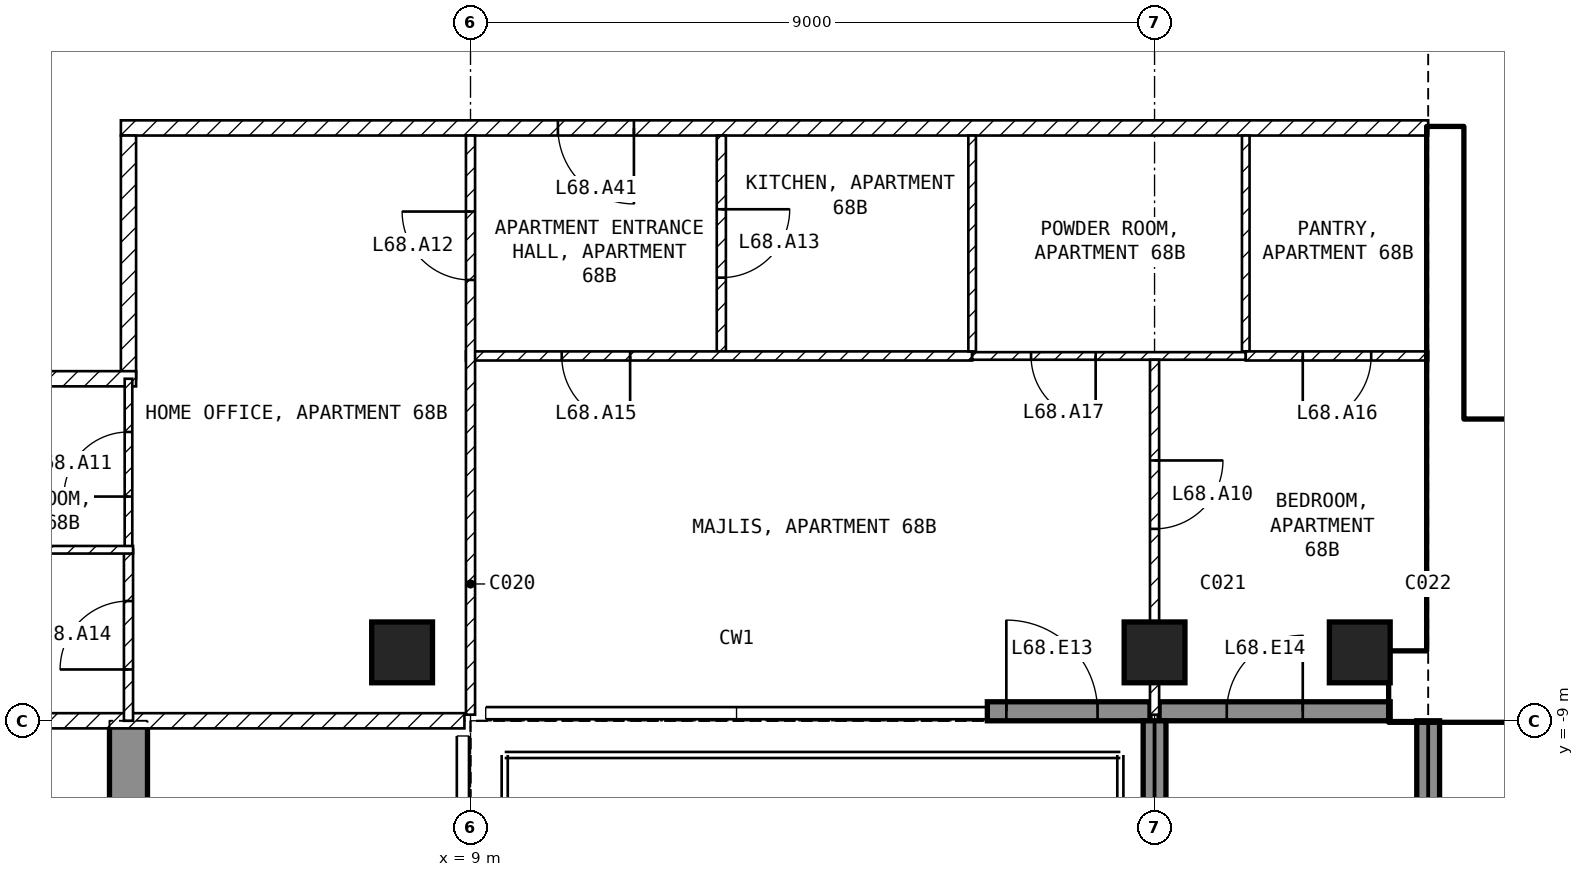
"""IFC4 building model, lengths in metres.
Left out: names, types, materials, properties, quantities, classifications, styles, units other than length and angle.
Written with IfcOpenShell. Run it as: python <this file> out.ifc"""

import sys

from ifc_helpers import new_model, si_unit, direction, frame, frame_2d, origin, origin_2d, place, context, subcontext, project, spatial, polyline, rectangle, outline, extrude, element, fill, save


model = new_model("IFC4")
c1 = context("Model", 3, precision=1e-05, world=origin(), true_north=direction((0.0, 1.0)))
c2 = subcontext(c1, "Body", "Model", "MODEL_VIEW")
j1 = project(units=[si_unit("LENGTHUNIT", "METRE"), si_unit("PLANEANGLEUNIT", "RADIAN")], contexts=[c1])
p1 = place(None, origin())
s1 = spatial("IfcSite", under=j1, at=p1, CompositionType="ELEMENT")
p2 = place(p1, origin())
s2 = spatial("IfcBuilding", under=s1, at=p2, CompositionType="ELEMENT")
p3 = place(p2, frame((0.0, 0.0, 267.5)))
s3 = spatial("IfcBuildingStorey", under=s2, at=p3, CompositionType="ELEMENT", Elevation=267.5)
for number, where, z_axis, x_axis in (
    (1, (8.1, -8.1, -0.25), (0.0, 0.0, 1.0), (1.0, 0.0, 0.0)),
    (2, (18.0, -8.1, -0.25), (0.0, 0.0, 1.0), (1.0, 0.0, 0.0)),
    (3, (20.7, -8.1, -0.25), (0.0, 0.0, 1.0), (1.0, 0.0, 0.0)),
):
    element("IfcColumn", number, at=place(p3, frame(where, z_axis=z_axis, x_axis=x_axis)), inside=s3, PredefinedType="COLUMN", context=c2, shape_type="SweptSolid", body=[
        extrude(rectangle(XDim=0.8, YDim=0.8, at=origin_2d()), origin(), (0.0, 0.0, 1.0), 3.5),
    ])
p4 = place(p3, frame((4.25, -16.7, -0.25), z_axis=(1.0, 0.0, 0.0), x_axis=(0.0, 1.0, 0.0)))
e4 = element("IfcWall", 4, at=p4, inside=s3, PredefinedType="SHEAR", context=c2, shape_type="SweptSolid", body=[
    extrude(outline(polyline([(0.0, 0.0), (3.2, 0.0), (3.2, 2.65), (5.6, 2.65), (5.6, 0.0), (7.7, 0.0), (7.7, 3.5), (0.0, 3.5), (0.0, 0.0)])), origin(), (0.0, 0.0, 1.0), 0.5),
])
p5 = place(p3, frame((15.8, -8.875, 0.0), z_axis=(0.0, 0.0, 1.0), x_axis=(1.0, 0.0, 0.0)))
e5 = element("IfcWall", 5, at=p5, inside=s3, PredefinedType="SOLIDWALL", context=c2, shape_type="SweptSolid", body=[
    extrude(rectangle(XDim=2.14, YDim=0.25, at=frame_2d((1.07, 0.0))), origin(), (0.0, 0.0, 1.0), 3.25),
])
p6 = place(p5, frame((0.25, 0.0, 0.0)))
e6 = element("IfcOpeningElement", 6, at=p6, cuts=e5, PredefinedType="OPENING", context=c2, shape_type="SweptSolid", body=[
    extrude(rectangle(XDim=1.2, YDim=2.4, at=frame_2d((0.6, 1.2))), frame((0.0, 0.135, 0.0), z_axis=(0.0, -1.0, 0.0), x_axis=(1.0, 0.0, 0.0)), (0.0, 0.0, 1.0), 0.27),
])
p7 = place(p3, frame((18.06, -8.875, 0.0), z_axis=(0.0, 0.0, 1.0), x_axis=(1.0, 0.0, 0.0)))
e7 = element("IfcWall", 7, at=p7, inside=s3, PredefinedType="SOLIDWALL", context=c2, shape_type="SweptSolid", body=[
    extrude(rectangle(XDim=3.04, YDim=0.25, at=frame_2d((1.52, 0.0))), origin(), (0.0, 0.0, 1.0), 3.25),
])
p8 = place(p7, frame((0.89, 0.0, 0.0)))
e8 = element("IfcOpeningElement", 8, at=p8, cuts=e7, PredefinedType="OPENING", context=c2, shape_type="SweptSolid", body=[
    extrude(rectangle(XDim=1.0, YDim=2.4, at=frame_2d((0.5, 1.2))), frame((0.0, 0.135, 0.0), z_axis=(0.0, -1.0, 0.0), x_axis=(1.0, 0.0, 0.0)), (0.0, 0.0, 1.0), 0.27),
])
p9 = place(p3, frame((18.0, -9.0, 0.0), z_axis=(0.0, 0.0, 1.0), x_axis=(0.0, -1.0, 0.0)))
e9 = element("IfcWall", 9, at=p9, inside=s3, PredefinedType="SOLIDWALL", context=c2, shape_type="SweptSolid", body=[
    extrude(rectangle(XDim=2.74, YDim=0.3, at=frame_2d((1.37, 0.0))), origin(), (0.0, 0.0, 1.0), 3.25),
])
p10 = place(p3, frame((21.6, -9.0, 0.0), z_axis=(0.0, 0.0, 1.0), x_axis=(0.0, -1.0, 0.0)))
e10 = element("IfcWall", 10, at=p10, inside=s3, PredefinedType="SOLIDWALL", context=c2, shape_type="SweptSolid", body=[
    extrude(rectangle(XDim=2.7, YDim=0.3, at=frame_2d((1.35, 0.0))), origin(), (0.0, 0.0, 1.0), 3.25),
])
p11 = place(p3, frame((21.1, -8.55, 0.0), z_axis=(0.0, 0.0, 1.0), x_axis=(1.0, 0.0, 0.0)))
e11 = element("IfcWall", 11, at=p11, inside=s3, PredefinedType="SHEAR", context=c2, shape_type="SweptSolid", body=[
    extrude(rectangle(XDim=9.1, YDim=0.9, at=frame_2d((4.55, 0.0))), origin(), (0.0, 0.0, 1.0), 3.25),
])
p12 = place(p3, frame((21.825, -8.1, 0.0), z_axis=(0.0, 0.0, 1.0), x_axis=(0.0, 1.0, 0.0)))
e12 = element("IfcWall", 12, at=p12, inside=s3, PredefinedType="SHEAR", context=c2, shape_type="SweptSolid", body=[
    extrude(rectangle(XDim=6.9, YDim=0.45, at=frame_2d((3.45, 0.0))), origin(), (0.0, 0.0, 1.0), 3.25),
])
p13 = place(p3, frame((22.05, -5.15, 0.0), z_axis=(0.0, 0.0, 1.0), x_axis=(1.0, 0.0, 0.0)))
e13 = element("IfcWall", 13, at=p13, inside=s3, PredefinedType="SOLIDWALL", context=c2, shape_type="SweptSolid", body=[
    extrude(rectangle(XDim=6.3, YDim=0.2, at=frame_2d((3.15, 0.0))), origin(), (0.0, 0.0, 1.0), 3.25),
])
p14 = place(p13, frame((0.2, 0.0, 0.0)))
e14 = element("IfcOpeningElement", 14, at=p14, cuts=e13, PredefinedType="OPENING", context=c2, shape_type="SweptSolid", body=[
    extrude(rectangle(XDim=1.0, YDim=2.1, at=frame_2d((0.5, 1.05))), frame((0.0, 0.11, 0.0), z_axis=(0.0, -1.0, 0.0), x_axis=(1.0, 0.0, 0.0)), (0.0, 0.0, 1.0), 0.22),
])
p15 = place(p3, frame((21.6, -1.2, 0.0), z_axis=(0.0, 0.0, 1.0), x_axis=(-1.0, 0.0, 0.0)))
e15 = element("IfcWall", 15, at=p15, inside=s3, PredefinedType="PARTITIONING", context=c2, shape_type="SweptSolid", body=[
    extrude(rectangle(XDim=17.2, YDim=0.2, at=frame_2d((8.6, 0.0))), origin(), (0.0, 0.0, 1.0), 3.25),
])
p16 = place(p15, frame((10.45, 0.0, 0.0)))
e16 = element("IfcOpeningElement", 16, at=p16, cuts=e15, PredefinedType="OPENING", context=c2, shape_type="SweptSolid", body=[
    extrude(rectangle(XDim=1.0, YDim=2.1, at=frame_2d((0.5, 1.05))), frame((0.0, 0.11, 0.0), z_axis=(0.0, -1.0, 0.0), x_axis=(1.0, 0.0, 0.0)), (0.0, 0.0, 1.0), 0.22),
])
p17 = place(p3, frame((4.5, -1.3, 0.0), z_axis=(0.0, 0.0, 1.0), x_axis=(0.0, -1.0, 0.0)))
e17 = element("IfcWall", 17, at=p17, inside=s3, PredefinedType="PARTITIONING", context=c2, shape_type="SweptSolid", body=[
    extrude(rectangle(XDim=3.2, YDim=0.2, at=frame_2d((1.6, 0.0))), origin(), (0.0, 0.0, 1.0), 3.25),
])
p18 = place(p3, frame((4.6, -4.5, 0.0), z_axis=(0.0, 0.0, 1.0), x_axis=(-1.0, 0.0, 0.0)))
e18 = element("IfcWall", 18, at=p18, inside=s3, PredefinedType="PARTITIONING", context=c2, shape_type="SweptSolid", body=[
    extrude(rectangle(XDim=3.5, YDim=0.2, at=frame_2d((1.75, 0.0))), origin(), (0.0, 0.0, 1.0), 3.25),
])
p19 = place(p3, frame((8.92, -9.0, 0.0), z_axis=(0.0, 0.0, 1.0), x_axis=(-1.0, 0.0, 0.0)))
e19 = element("IfcWall", 19, at=p19, inside=s3, PredefinedType="PARTITIONING", context=c2, shape_type="SweptSolid", body=[
    extrude(rectangle(XDim=17.84, YDim=0.2, at=frame_2d((8.92, 0.0))), origin(), (0.0, 0.0, 1.0), 3.25),
])
p20 = place(p19, frame((8.42, 0.0, 0.0)))
e20 = element("IfcOpeningElement", 20, at=p20, cuts=e19, PredefinedType="OPENING", context=c2, shape_type="SweptSolid", body=[
    extrude(rectangle(XDim=1.0, YDim=2.1, at=frame_2d((0.5, 1.05))), frame((0.0, 0.11, 0.0), z_axis=(0.0, -1.0, 0.0), x_axis=(1.0, 0.0, 0.0)), (0.0, 0.0, 1.0), 0.22),
])
p21 = place(p3, frame((12.3, -1.3, 0.0), z_axis=(0.0, 0.0, 1.0), x_axis=(0.0, -1.0, 0.0)))
e21 = element("IfcWall", 21, at=p21, inside=s3, PredefinedType="PARTITIONING", context=c2, shape_type="SweptSolid", body=[
    extrude(rectangle(XDim=2.84, YDim=0.12, at=frame_2d((1.42, 0.0))), origin(), (0.0, 0.0, 1.0), 3.25),
])
p22 = place(p21, frame((0.97, 0.0, 0.0)))
e22 = element("IfcOpeningElement", 22, at=p22, cuts=e21, PredefinedType="OPENING", context=c2, shape_type="SweptSolid", body=[
    extrude(rectangle(XDim=0.9, YDim=2.1, at=frame_2d((0.45, 1.05))), frame((0.0, 0.07, 0.0), z_axis=(0.0, -1.0, 0.0), x_axis=(1.0, 0.0, 0.0)), (0.0, 0.0, 1.0), 0.14),
])
p23 = place(p3, frame((15.6, -4.2, 0.0), z_axis=(0.0, 0.0, 1.0), x_axis=(-1.0, 0.0, 0.0)))
e23 = element("IfcWall", 23, at=p23, inside=s3, PredefinedType="PARTITIONING", context=c2, shape_type="SweptSolid", body=[
    extrude(rectangle(XDim=6.66, YDim=0.12, at=frame_2d((3.33, 0.0))), origin(), (0.0, 0.0, 1.0), 3.25),
])
p24 = place(p23, frame((4.5, 0.0, 0.0)))
e24 = element("IfcOpeningElement", 24, at=p24, cuts=e23, PredefinedType="OPENING", context=c2, shape_type="SweptSolid", body=[
    extrude(rectangle(XDim=0.9, YDim=2.1, at=frame_2d((0.45, 1.05))), frame((0.0, 0.07, 0.0), z_axis=(0.0, -1.0, 0.0), x_axis=(1.0, 0.0, 0.0)), (0.0, 0.0, 1.0), 0.14),
])
p25 = place(p3, frame((9.0, -8.92, 0.0), z_axis=(0.0, 0.0, 1.0), x_axis=(0.0, 1.0, 0.0)))
e25 = element("IfcWall", 25, at=p25, inside=s3, PredefinedType="PARTITIONING", context=c2, shape_type="SweptSolid", body=[
    extrude(rectangle(XDim=7.62, YDim=0.12, at=frame_2d((3.81, 0.0))), origin(), (0.0, 0.0, 1.0), 3.25),
])
p26 = place(p25, frame((5.72, 0.0, 0.0)))
e26 = element("IfcOpeningElement", 26, at=p26, cuts=e25, PredefinedType="OPENING", context=c2, shape_type="SweptSolid", body=[
    extrude(rectangle(XDim=0.9, YDim=2.1, at=frame_2d((0.45, 1.05))), frame((0.0, 0.07, 0.0), z_axis=(0.0, -1.0, 0.0), x_axis=(1.0, 0.0, 0.0)), (0.0, 0.0, 1.0), 0.14),
])
for number, where, z_axis, x_axis in (
    (27, (15.6, -1.3, 0.0), (0.0, 0.0, 1.0), (0.0, -1.0, 0.0)),
    (28, (19.2, -1.3, 0.0), (0.0, 0.0, 1.0), (0.0, -1.0, 0.0)),
):
    element("IfcWall", number, at=place(p3, frame(where, z_axis=z_axis, x_axis=x_axis)), inside=s3, PredefinedType="PARTITIONING", context=c2, shape_type="SweptSolid", body=[
        extrude(rectangle(XDim=2.84, YDim=0.1, at=frame_2d((1.42, 0.0))), origin(), (0.0, 0.0, 1.0), 3.25),
    ])
p27 = place(p3, frame((19.2, -4.2, 0.0), z_axis=(0.0, 0.0, 1.0), x_axis=(-1.0, 0.0, 0.0)))
e29 = element("IfcWall", 29, at=p27, inside=s3, PredefinedType="PARTITIONING", context=c2, shape_type="SweptSolid", body=[
    extrude(rectangle(XDim=3.6, YDim=0.1, at=frame_2d((1.8, 0.0))), origin(), (0.0, 0.0, 1.0), 3.25),
])
p28 = place(p27, frame((1.975, 0.0, 0.0)))
e30 = element("IfcOpeningElement", 30, at=p28, cuts=e29, PredefinedType="OPENING", context=c2, shape_type="SweptSolid", body=[
    extrude(rectangle(XDim=0.85, YDim=2.1, at=frame_2d((0.425, 1.05))), frame((0.0, 0.06, 0.0), z_axis=(0.0, -1.0, 0.0), x_axis=(1.0, 0.0, 0.0)), (0.0, 0.0, 1.0), 0.12),
])
p29 = place(p3, frame((21.6, -4.2, 0.0), z_axis=(0.0, 0.0, 1.0), x_axis=(-1.0, 0.0, 0.0)))
e31 = element("IfcWall", 31, at=p29, inside=s3, PredefinedType="PARTITIONING", context=c2, shape_type="SweptSolid", body=[
    extrude(rectangle(XDim=2.4, YDim=0.12, at=frame_2d((1.2, 0.0))), origin(), (0.0, 0.0, 1.0), 3.25),
])
p30 = place(p29, frame((0.75, 0.0, 0.0)))
e32 = element("IfcOpeningElement", 32, at=p30, cuts=e31, PredefinedType="OPENING", context=c2, shape_type="SweptSolid", body=[
    extrude(rectangle(XDim=0.9, YDim=2.1, at=frame_2d((0.45, 1.05))), frame((0.0, 0.07, 0.0), z_axis=(0.0, -1.0, 0.0), x_axis=(1.0, 0.0, 0.0)), (0.0, 0.0, 1.0), 0.14),
])
p31 = place(p3, frame((18.0, -4.25, 0.0), z_axis=(0.0, 0.0, 1.0), x_axis=(0.0, -1.0, 0.0)))
e33 = element("IfcWall", 33, at=p31, inside=s3, PredefinedType="PARTITIONING", context=c2, shape_type="SweptSolid", body=[
    extrude(rectangle(XDim=4.67, YDim=0.12, at=frame_2d((2.335, 0.0))), origin(), (0.0, 0.0, 1.0), 2.496),
])
p32 = place(p31, frame((1.325, 0.0, 0.0)))
e34 = element("IfcOpeningElement", 34, at=p32, cuts=e33, PredefinedType="OPENING", context=c2, shape_type="SweptSolid", body=[
    extrude(rectangle(XDim=0.9, YDim=2.1, at=frame_2d((0.45, 1.05))), frame((0.0, 0.07, 0.0), z_axis=(0.0, -1.0, 0.0), x_axis=(1.0, 0.0, 0.0)), (0.0, 0.0, 1.0), 0.14),
])
p33 = place(p3, frame((4.5, -6.75, 0.0), z_axis=(0.0, 0.0, 1.0), x_axis=(0.0, 1.0, 0.0)))
e35 = element("IfcWall", 35, at=p33, inside=s3, PredefinedType="PARTITIONING", context=c2, shape_type="SweptSolid", body=[
    extrude(rectangle(XDim=2.25, YDim=0.1, at=frame_2d((1.125, 0.0))), origin(), (0.0, 0.0, 1.0), 3.25),
])
p34 = place(p33, frame((0.7, 0.0, 0.0)))
e36 = element("IfcOpeningElement", 36, at=p34, cuts=e35, PredefinedType="OPENING", context=c2, shape_type="SweptSolid", body=[
    extrude(rectangle(XDim=0.85, YDim=2.1, at=frame_2d((0.425, 1.05))), frame((0.0, 0.06, 0.0), z_axis=(0.0, -1.0, 0.0), x_axis=(1.0, 0.0, 0.0)), (0.0, 0.0, 1.0), 0.12),
])
p35 = place(p3, frame((4.5, -9.0, 0.0), z_axis=(0.0, 0.0, 1.0), x_axis=(0.0, 1.0, 0.0)))
e37 = element("IfcWall", 37, at=p35, inside=s3, PredefinedType="PARTITIONING", context=c2, shape_type="SweptSolid", body=[
    extrude(rectangle(XDim=2.25, YDim=0.12, at=frame_2d((1.125, 0.0))), origin(), (0.0, 0.0, 1.0), 3.25),
])
p36 = place(p35, frame((0.675, 0.0, 0.0)))
e38 = element("IfcOpeningElement", 38, at=p36, cuts=e37, PredefinedType="OPENING", context=c2, shape_type="SweptSolid", body=[
    extrude(rectangle(XDim=0.9, YDim=2.1, at=frame_2d((0.45, 1.05))), frame((0.0, 0.07, 0.0), z_axis=(0.0, -1.0, 0.0), x_axis=(1.0, 0.0, 0.0)), (0.0, 0.0, 1.0), 0.14),
])
p37 = place(p3, frame((4.56, -6.75, 0.0), z_axis=(0.0, 0.0, 1.0), x_axis=(-1.0, 0.0, 0.0)))
e39 = element("IfcWall", 39, at=p37, inside=s3, PredefinedType="PARTITIONING", context=c2, shape_type="SweptSolid", body=[
    extrude(rectangle(XDim=3.46, YDim=0.1, at=frame_2d((1.73, 0.0))), origin(), (0.0, 0.0, 1.0), 3.25),
])
p38 = place(p6, origin())
e40 = element("IfcDoor", 40, at=p38, inside=s3, OperationType="SINGLE_SWING_LEFT", PredefinedType="DOOR", context=c2, shape_type="SweptSolid", body=[
    extrude(rectangle(XDim=1.2, YDim=2.4, at=frame_2d((0.6, 1.2))), frame((0.0, 0.025, 0.0), z_axis=(0.0, -1.0, 0.0), x_axis=(1.0, 0.0, 0.0)), (0.0, 0.0, 1.0), 0.05),
])
fill(e6, e40)
p39 = place(p8, origin())
e41 = element("IfcDoor", 41, at=p39, inside=s3, OperationType="SINGLE_SWING_RIGHT", PredefinedType="DOOR", context=c2, shape_type="SweptSolid", body=[
    extrude(rectangle(XDim=1.0, YDim=2.4, at=frame_2d((0.5, 1.2))), frame((0.0, 0.025, 0.0), z_axis=(0.0, -1.0, 0.0), x_axis=(1.0, 0.0, 0.0)), (0.0, 0.0, 1.0), 0.05),
])
fill(e8, e41)
p40 = place(p14, origin())
e42 = element("IfcDoor", 42, at=p40, inside=s3, OperationType="SINGLE_SWING_LEFT", PredefinedType="DOOR", context=c2, shape_type="SweptSolid", body=[
    extrude(rectangle(XDim=1.0, YDim=2.1, at=frame_2d((0.5, 1.05))), frame((0.0, 0.025, 0.0), z_axis=(0.0, -1.0, 0.0), x_axis=(1.0, 0.0, 0.0)), (0.0, 0.0, 1.0), 0.05),
])
fill(e14, e42)
p41 = place(p32, origin())
e43 = element("IfcDoor", 43, at=p41, inside=s3, OperationType="SINGLE_SWING_LEFT", PredefinedType="DOOR", context=c2, shape_type="SweptSolid", body=[
    extrude(rectangle(XDim=0.9, YDim=2.1, at=frame_2d((0.45, 1.05))), frame((0.0, 0.025, 0.0), z_axis=(0.0, -1.0, 0.0), x_axis=(1.0, 0.0, 0.0)), (0.0, 0.0, 1.0), 0.05),
])
fill(e34, e43)
p42 = place(p34, origin())
e44 = element("IfcDoor", 44, at=p42, inside=s3, OperationType="SINGLE_SWING_LEFT", PredefinedType="DOOR", context=c2, shape_type="SweptSolid", body=[
    extrude(rectangle(XDim=0.85, YDim=2.1, at=frame_2d((0.425, 1.05))), frame((0.0, 0.025, 0.0), z_axis=(0.0, -1.0, 0.0), x_axis=(1.0, 0.0, 0.0)), (0.0, 0.0, 1.0), 0.05),
])
fill(e36, e44)
p43 = place(p26, origin())
e45 = element("IfcDoor", 45, at=p43, inside=s3, OperationType="SINGLE_SWING_RIGHT", PredefinedType="DOOR", context=c2, shape_type="SweptSolid", body=[
    extrude(rectangle(XDim=0.9, YDim=2.1, at=frame_2d((0.45, 1.05))), frame((0.0, 0.025, 0.0), z_axis=(0.0, -1.0, 0.0), x_axis=(1.0, 0.0, 0.0)), (0.0, 0.0, 1.0), 0.05),
])
fill(e26, e45)
p44 = place(p22, origin())
e46 = element("IfcDoor", 46, at=p44, inside=s3, OperationType="SINGLE_SWING_LEFT", PredefinedType="DOOR", context=c2, shape_type="SweptSolid", body=[
    extrude(rectangle(XDim=0.9, YDim=2.1, at=frame_2d((0.45, 1.05))), frame((0.0, 0.025, 0.0), z_axis=(0.0, -1.0, 0.0), x_axis=(1.0, 0.0, 0.0)), (0.0, 0.0, 1.0), 0.05),
])
fill(e22, e46)
p45 = place(p36, origin())
e47 = element("IfcDoor", 47, at=p45, inside=s3, OperationType="SINGLE_SWING_LEFT", PredefinedType="DOOR", context=c2, shape_type="SweptSolid", body=[
    extrude(rectangle(XDim=0.9, YDim=2.1, at=frame_2d((0.45, 1.05))), frame((0.0, 0.025, 0.0), z_axis=(0.0, -1.0, 0.0), x_axis=(1.0, 0.0, 0.0)), (0.0, 0.0, 1.0), 0.05),
])
fill(e38, e47)
p46 = place(p24, origin())
e48 = element("IfcDoor", 48, at=p46, inside=s3, OperationType="SINGLE_SWING_LEFT", PredefinedType="DOOR", context=c2, shape_type="SweptSolid", body=[
    extrude(rectangle(XDim=0.9, YDim=2.1, at=frame_2d((0.45, 1.05))), frame((0.0, 0.025, 0.0), z_axis=(0.0, -1.0, 0.0), x_axis=(1.0, 0.0, 0.0)), (0.0, 0.0, 1.0), 0.05),
])
fill(e24, e48)
p47 = place(p30, origin())
e49 = element("IfcDoor", 49, at=p47, inside=s3, OperationType="SINGLE_SWING_RIGHT", PredefinedType="DOOR", context=c2, shape_type="SweptSolid", body=[
    extrude(rectangle(XDim=0.9, YDim=2.1, at=frame_2d((0.45, 1.05))), frame((0.0, 0.025, 0.0), z_axis=(0.0, -1.0, 0.0), x_axis=(1.0, 0.0, 0.0)), (0.0, 0.0, 1.0), 0.05),
])
fill(e32, e49)
p48 = place(p28, origin())
e50 = element("IfcDoor", 50, at=p48, inside=s3, OperationType="SINGLE_SWING_LEFT", PredefinedType="DOOR", context=c2, shape_type="SweptSolid", body=[
    extrude(rectangle(XDim=0.85, YDim=2.1, at=frame_2d((0.425, 1.05))), frame((0.0, 0.025, 0.0), z_axis=(0.0, -1.0, 0.0), x_axis=(1.0, 0.0, 0.0)), (0.0, 0.0, 1.0), 0.05),
])
fill(e30, e50)
p49 = place(p16, origin())
e51 = element("IfcDoor", 51, at=p49, inside=s3, OperationType="SINGLE_SWING_LEFT", PredefinedType="DOOR", context=c2, shape_type="SweptSolid", body=[
    extrude(rectangle(XDim=1.0, YDim=2.1, at=frame_2d((0.5, 1.05))), frame((0.0, 0.025, 0.0), z_axis=(0.0, -1.0, 0.0), x_axis=(1.0, 0.0, 0.0)), (0.0, 0.0, 1.0), 0.05),
])
fill(e16, e51)
save(model, sys.argv[1])
